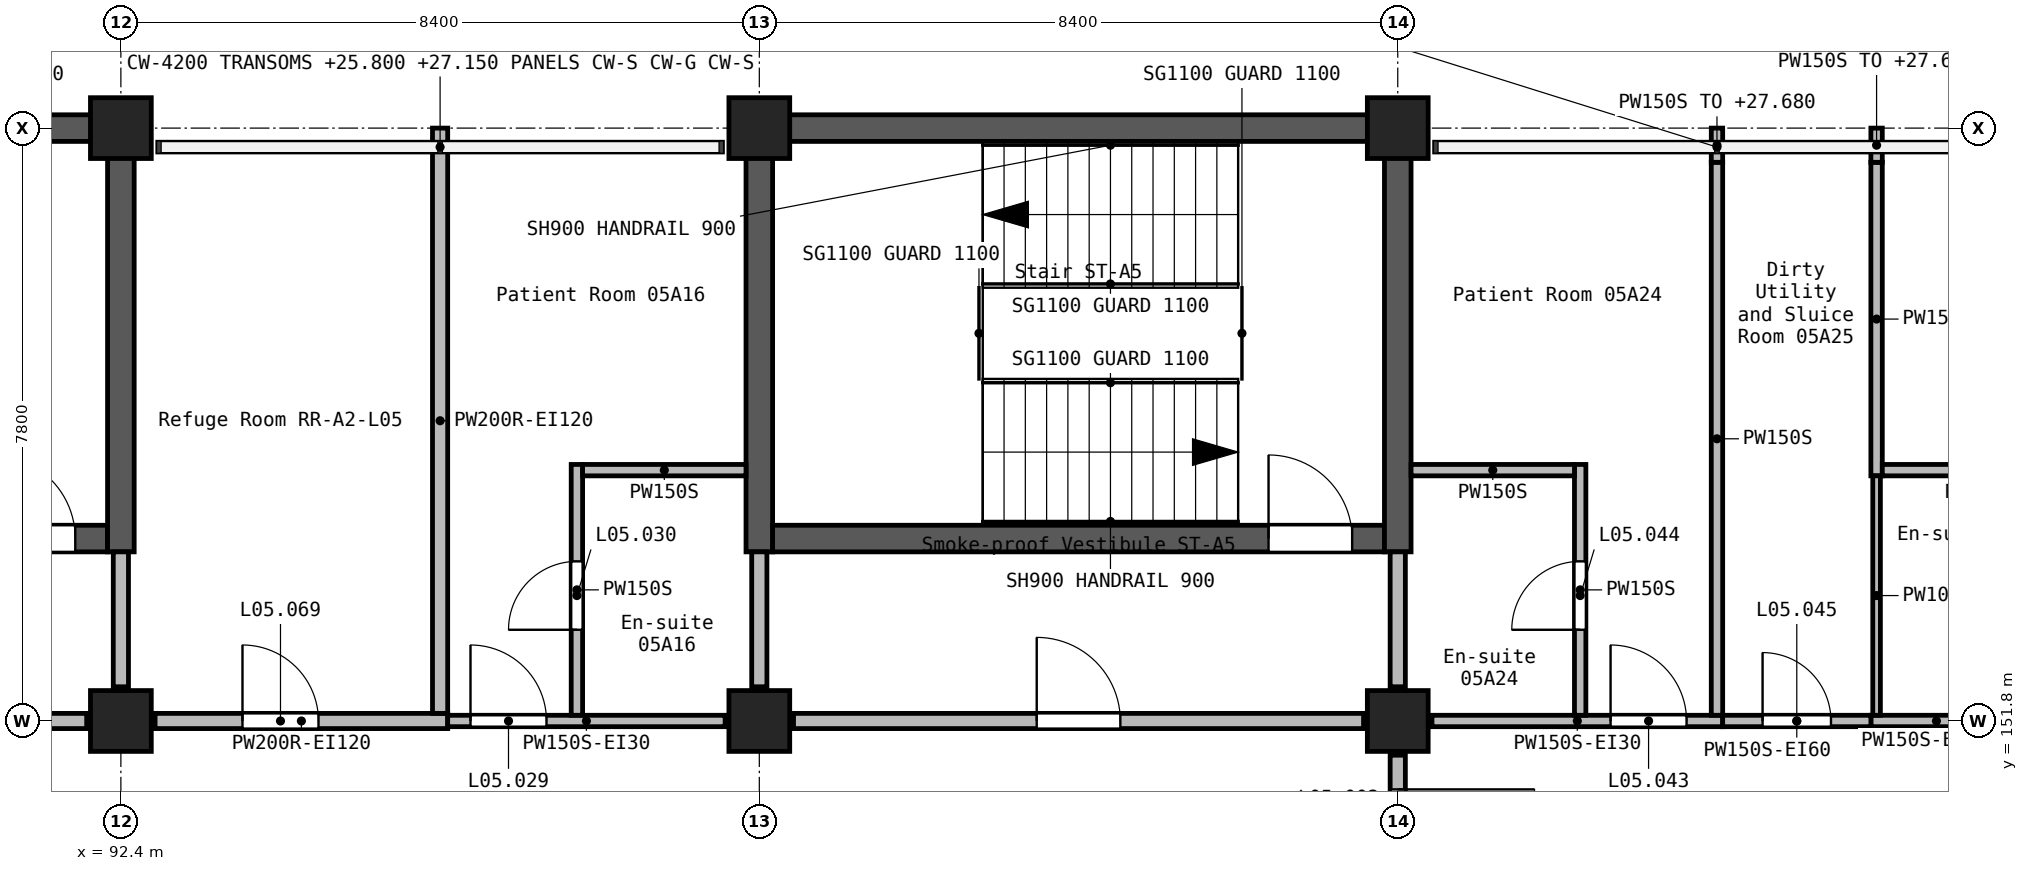
"""IFC4 building model, lengths in metres.
Left out: names, types, materials, properties, quantities, classifications, styles, units other than length and angle.
Written with IfcOpenShell. Run it as: python <this file> out.ifc"""

import sys

from ifc_helpers import new_model, si_unit, direction, frame, frame_2d, origin, origin_2d, place, context, subcontext, project, spatial, rectangle, extrude, element, fill, save


model = new_model("IFC4")
c1 = context("Model", 3, precision=1e-05, world=origin(), true_north=direction((0.0, 1.0)))
c2 = subcontext(c1, "Body", "Model", "MODEL_VIEW")
j1 = project(units=[si_unit("LENGTHUNIT", "METRE"), si_unit("PLANEANGLEUNIT", "RADIAN")], contexts=[c1])
p1 = place(None, origin())
s1 = spatial("IfcSite", under=j1, at=p1, CompositionType="ELEMENT")
p2 = place(p1, origin())
s2 = spatial("IfcBuilding", under=s1, at=p2, CompositionType="ELEMENT")
p3 = place(p2, frame((0.0, 0.0, 24.9)))
s3 = spatial("IfcBuildingStorey", under=s2, at=p3, CompositionType="ELEMENT", Elevation=24.9)
for number, where, z_axis, x_axis in (
    (1, (92.4, 151.8, 0.0), (0.0, 0.0, 1.0), (1.0, 0.0, 0.0)),
    (2, (92.4, 159.6, 0.0), (0.0, 0.0, 1.0), (1.0, 0.0, 0.0)),
    (3, (100.8, 151.8, 0.0), (0.0, 0.0, 1.0), (1.0, 0.0, 0.0)),
    (4, (100.8, 159.6, 0.0), (0.0, 0.0, 1.0), (1.0, 0.0, 0.0)),
    (5, (109.2, 151.8, 0.0), (0.0, 0.0, 1.0), (1.0, 0.0, 0.0)),
    (6, (109.2, 159.6, 0.0), (0.0, 0.0, 1.0), (1.0, 0.0, 0.0)),
):
    element("IfcColumn", number, at=place(p3, frame(where, z_axis=z_axis, x_axis=x_axis)), inside=s3, PredefinedType="COLUMN", context=c2, shape_type="SweptSolid", body=[
        extrude(rectangle(XDim=0.8, YDim=0.8, at=origin_2d()), origin(), (0.0, 0.0, 1.0), 3.9),
    ])
p4 = place(p3, frame((83.825, 159.6, 0.0), z_axis=(0.0, 0.0, 1.0), x_axis=(1.0, 0.0, 0.0)))
e7 = element("IfcWall", 7, at=p4, inside=s3, PredefinedType="SHEAR", context=c2, shape_type="SweptSolid", body=[
    extrude(rectangle(XDim=8.4, YDim=0.35, at=frame_2d((4.2, 0.0))), origin(), (0.0, 0.0, 1.0), 3.9),
])
p5 = place(p3, frame((84.175, 154.2, 0.0), z_axis=(0.0, 0.0, 1.0), x_axis=(1.0, 0.0, 0.0)))
e8 = element("IfcWall", 8, at=p5, inside=s3, PredefinedType="SHEAR", context=c2, shape_type="SweptSolid", body=[
    extrude(rectangle(XDim=8.05, YDim=0.35, at=frame_2d((4.025, 0.0))), origin(), (0.0, 0.0, 1.0), 3.9),
])
p6 = place(p5, frame((6.525, 0.0, 0.0)))
e9 = element("IfcOpeningElement", 9, at=p6, cuts=e8, PredefinedType="OPENING", context=c2, shape_type="SweptSolid", body=[
    extrude(rectangle(XDim=1.1, YDim=2.1, at=frame_2d((0.55, 1.05))), frame((0.0, 0.185, 0.0), z_axis=(0.0, -1.0, 0.0), x_axis=(1.0, 0.0, 0.0)), (0.0, 0.0, 1.0), 0.37),
])
p7 = place(p3, frame((92.4, 154.025, 0.0), z_axis=(0.0, 0.0, 1.0), x_axis=(0.0, 1.0, 0.0)))
e10 = element("IfcWall", 10, at=p7, inside=s3, PredefinedType="SHEAR", context=c2, shape_type="SweptSolid", body=[
    extrude(rectangle(XDim=5.75, YDim=0.35, at=frame_2d((2.875, 0.0))), origin(), (0.0, 0.0, 1.0), 3.9),
])
p8 = place(p3, frame((100.625, 159.6, 0.0), z_axis=(0.0, 0.0, 1.0), x_axis=(1.0, 0.0, 0.0)))
e11 = element("IfcWall", 11, at=p8, inside=s3, PredefinedType="SHEAR", context=c2, shape_type="SweptSolid", body=[
    extrude(rectangle(XDim=8.4, YDim=0.35, at=frame_2d((4.2, 0.0))), origin(), (0.0, 0.0, 1.0), 3.9),
])
p9 = place(p3, frame((100.8, 154.025, 0.0), z_axis=(0.0, 0.0, 1.0), x_axis=(0.0, 1.0, 0.0)))
e12 = element("IfcWall", 12, at=p9, inside=s3, PredefinedType="SHEAR", context=c2, shape_type="SweptSolid", body=[
    extrude(rectangle(XDim=5.4, YDim=0.35, at=frame_2d((2.7, 0.0))), origin(), (0.0, 0.0, 1.0), 3.9),
])
p10 = place(p3, frame((100.975, 154.2, 0.0), z_axis=(0.0, 0.0, 1.0), x_axis=(1.0, 0.0, 0.0)))
e13 = element("IfcWall", 13, at=p10, inside=s3, PredefinedType="SHEAR", context=c2, shape_type="SweptSolid", body=[
    extrude(rectangle(XDim=8.05, YDim=0.35, at=frame_2d((4.025, 0.0))), origin(), (0.0, 0.0, 1.0), 3.9),
])
p11 = place(p10, frame((6.525, 0.0, 0.0)))
e14 = element("IfcOpeningElement", 14, at=p11, cuts=e13, PredefinedType="OPENING", context=c2, shape_type="SweptSolid", body=[
    extrude(rectangle(XDim=1.1, YDim=2.1, at=frame_2d((0.55, 1.05))), frame((0.0, 0.185, 0.0), z_axis=(0.0, -1.0, 0.0), x_axis=(1.0, 0.0, 0.0)), (0.0, 0.0, 1.0), 0.37),
])
p12 = place(p3, frame((109.2, 154.025, 0.0), z_axis=(0.0, 0.0, 1.0), x_axis=(0.0, 1.0, 0.0)))
e15 = element("IfcWall", 15, at=p12, inside=s3, PredefinedType="SHEAR", context=c2, shape_type="SweptSolid", body=[
    extrude(rectangle(XDim=5.75, YDim=0.35, at=frame_2d((2.875, 0.0))), origin(), (0.0, 0.0, 1.0), 3.9),
])
p13 = place(p3, frame((109.2, 154.025, 0.0), z_axis=(0.0, 0.0, 1.0), x_axis=(0.0, -1.0, 0.0)))
e16 = element("IfcWall", 16, at=p13, inside=s3, PredefinedType="SOLIDWALL", context=c2, shape_type="SweptSolid", body=[
    extrude(rectangle(XDim=1.775, YDim=0.2, at=frame_2d((0.887, 0.0))), origin(), (0.0, 0.0, 1.0), 3.6),
])
p14 = place(p3, frame((109.2, 151.35, 0.0), z_axis=(0.0, 0.0, 1.0), x_axis=(0.0, -1.0, 0.0)))
e17 = element("IfcWall", 17, at=p14, inside=s3, PredefinedType="SOLIDWALL", context=c2, shape_type="SweptSolid", body=[
    extrude(rectangle(XDim=2.7, YDim=0.2, at=frame_2d((1.35, 0.0))), origin(), (0.0, 0.0, 1.0), 3.6),
])
p15 = place(p14, frame((0.45, 0.0, 0.0)))
e18 = element("IfcOpeningElement", 18, at=p15, cuts=e17, PredefinedType="OPENING", context=c2, shape_type="SweptSolid", body=[
    extrude(rectangle(XDim=1.8, YDim=2.1, at=frame_2d((0.9, 1.05))), frame((0.0, 0.11, 0.0), z_axis=(0.0, -1.0, 0.0), x_axis=(1.0, 0.0, 0.0)), (0.0, 0.0, 1.0), 0.22),
])
p16 = place(p3, frame((84.45, 151.8, 0.0), z_axis=(0.0, 0.0, 1.0), x_axis=(1.0, 0.0, 0.0)))
e19 = element("IfcWall", 19, at=p16, inside=s3, PredefinedType="SOLIDWALL", context=c2, shape_type="SweptSolid", body=[
    extrude(rectangle(XDim=7.5, YDim=0.2, at=frame_2d((3.75, 0.0))), origin(), (0.0, 0.0, 1.0), 3.6),
])
p17 = place(p16, frame((3.2, 0.0, 0.0)))
e20 = element("IfcOpeningElement", 20, at=p17, cuts=e19, PredefinedType="OPENING", context=c2, shape_type="SweptSolid", body=[
    extrude(rectangle(XDim=1.1, YDim=2.1, at=frame_2d((0.55, 1.05))), frame((0.0, 0.11, 0.0), z_axis=(0.0, -1.0, 0.0), x_axis=(1.0, 0.0, 0.0)), (0.0, 0.0, 1.0), 0.22),
])
p18 = place(p3, frame((92.85, 151.8, 0.0), z_axis=(0.0, 0.0, 1.0), x_axis=(1.0, 0.0, 0.0)))
e21 = element("IfcWall", 21, at=p18, inside=s3, PredefinedType="SOLIDWALL", context=c2, shape_type="SweptSolid", body=[
    extrude(rectangle(XDim=3.85, YDim=0.2, at=frame_2d((1.925, 0.0))), origin(), (0.0, 0.0, 1.0), 3.6),
])
p19 = place(p18, frame((1.15, 0.0, 0.0)))
e22 = element("IfcOpeningElement", 22, at=p19, cuts=e21, PredefinedType="OPENING", context=c2, shape_type="SweptSolid", body=[
    extrude(rectangle(XDim=1.0, YDim=2.1, at=frame_2d((0.5, 1.05))), frame((0.0, 0.11, 0.0), z_axis=(0.0, -1.0, 0.0), x_axis=(1.0, 0.0, 0.0)), (0.0, 0.0, 1.0), 0.22),
])
p20 = place(p3, frame((92.4, 152.25, 0.0), z_axis=(0.0, 0.0, 1.0), x_axis=(0.0, 1.0, 0.0)))
e23 = element("IfcWall", 23, at=p20, inside=s3, PredefinedType="SOLIDWALL", context=c2, shape_type="SweptSolid", body=[
    extrude(rectangle(XDim=1.775, YDim=0.2, at=frame_2d((0.887, 0.0))), origin(), (0.0, 0.0, 1.0), 3.6),
])
p21 = place(p3, frame((101.25, 151.8, 0.0), z_axis=(0.0, 0.0, 1.0), x_axis=(1.0, 0.0, 0.0)))
e24 = element("IfcWall", 24, at=p21, inside=s3, PredefinedType="SOLIDWALL", context=c2, shape_type="SweptSolid", body=[
    extrude(rectangle(XDim=7.5, YDim=0.2, at=frame_2d((3.75, 0.0))), origin(), (0.0, 0.0, 1.0), 3.6),
])
p22 = place(p21, frame((3.2, 0.0, 0.0)))
e25 = element("IfcOpeningElement", 25, at=p22, cuts=e24, PredefinedType="OPENING", context=c2, shape_type="SweptSolid", body=[
    extrude(rectangle(XDim=1.1, YDim=2.1, at=frame_2d((0.55, 1.05))), frame((0.0, 0.11, 0.0), z_axis=(0.0, -1.0, 0.0), x_axis=(1.0, 0.0, 0.0)), (0.0, 0.0, 1.0), 0.22),
])
p23 = place(p3, frame((96.6, 151.9, 0.0), z_axis=(0.0, 0.0, 1.0), x_axis=(0.0, 1.0, 0.0)))
e26 = element("IfcWall", 26, at=p23, inside=s3, PredefinedType="SOLIDWALL", context=c2, shape_type="SweptSolid", body=[
    extrude(rectangle(XDim=7.7, YDim=0.2, at=frame_2d((3.85, 0.0))), origin(), (0.0, 0.0, 1.0), 3.6),
])
p24 = place(p3, frame((100.8, 152.25, 0.0), z_axis=(0.0, 0.0, 1.0), x_axis=(0.0, 1.0, 0.0)))
e27 = element("IfcWall", 27, at=p24, inside=s3, PredefinedType="SOLIDWALL", context=c2, shape_type="SweptSolid", body=[
    extrude(rectangle(XDim=1.775, YDim=0.2, at=frame_2d((0.887, 0.0))), origin(), (0.0, 0.0, 1.0), 3.6),
])
p25 = place(p3, frame((117.15, 151.8, 0.0), z_axis=(0.0, 0.0, 1.0), x_axis=(-1.0, 0.0, 0.0)))
e28 = element("IfcWall", 28, at=p25, inside=s3, PredefinedType="PARTITIONING", context=c2, shape_type="SweptSolid", body=[
    extrude(rectangle(XDim=1.725, YDim=0.15, at=frame_2d((0.862, 0.0))), origin(), (0.0, 0.0, 1.0), 3.6),
])
p26 = place(p3, frame((96.7, 151.8, 0.0), z_axis=(0.0, 0.0, 1.0), x_axis=(1.0, 0.0, 0.0)))
e29 = element("IfcWall", 29, at=p26, inside=s3, PredefinedType="PARTITIONING", context=c2, shape_type="SweptSolid", body=[
    extrude(rectangle(XDim=3.65, YDim=0.15, at=frame_2d((1.825, 0.0))), origin(), (0.0, 0.0, 1.0), 3.6),
])
p27 = place(p26, frame((0.3, 0.0, 0.0)))
e30 = element("IfcOpeningElement", 30, at=p27, cuts=e29, PredefinedType="OPENING", context=c2, shape_type="SweptSolid", body=[
    extrude(rectangle(XDim=1.0, YDim=2.1, at=frame_2d((0.5, 1.05))), frame((0.0, 0.085, 0.0), z_axis=(0.0, -1.0, 0.0), x_axis=(1.0, 0.0, 0.0)), (0.0, 0.0, 1.0), 0.17),
])
p28 = place(p3, frame((109.65, 151.8, 0.0), z_axis=(0.0, 0.0, 1.0), x_axis=(1.0, 0.0, 0.0)))
e31 = element("IfcWall", 31, at=p28, inside=s3, PredefinedType="PARTITIONING", context=c2, shape_type="SweptSolid", body=[
    extrude(rectangle(XDim=3.825, YDim=0.15, at=frame_2d((1.913, 0.0))), origin(), (0.0, 0.0, 1.0), 3.6),
])
p29 = place(p28, frame((2.35, 0.0, 0.0)))
e32 = element("IfcOpeningElement", 32, at=p29, cuts=e31, PredefinedType="OPENING", context=c2, shape_type="SweptSolid", body=[
    extrude(rectangle(XDim=1.0, YDim=2.1, at=frame_2d((0.5, 1.05))), frame((0.0, 0.085, 0.0), z_axis=(0.0, -1.0, 0.0), x_axis=(1.0, 0.0, 0.0)), (0.0, 0.0, 1.0), 0.17),
])
p30 = place(p3, frame((113.475, 151.8, 0.0), z_axis=(0.0, 0.0, 1.0), x_axis=(1.0, 0.0, 0.0)))
e33 = element("IfcWall", 33, at=p30, inside=s3, PredefinedType="PARTITIONING", context=c2, shape_type="SweptSolid", body=[
    extrude(rectangle(XDim=1.95, YDim=0.15, at=frame_2d((0.975, 0.0))), origin(), (0.0, 0.0, 1.0), 3.6),
])
p31 = place(p30, frame((0.525, 0.0, 0.0)))
e34 = element("IfcOpeningElement", 34, at=p31, cuts=e33, PredefinedType="OPENING", context=c2, shape_type="SweptSolid", body=[
    extrude(rectangle(XDim=0.9, YDim=2.1, at=frame_2d((0.45, 1.05))), frame((0.0, 0.085, 0.0), z_axis=(0.0, -1.0, 0.0), x_axis=(1.0, 0.0, 0.0)), (0.0, 0.0, 1.0), 0.17),
])
p32 = place(p3, frame((113.4, 151.875, 0.0), z_axis=(0.0, 0.0, 1.0), x_axis=(0.0, 1.0, 0.0)))
e35 = element("IfcWall", 35, at=p32, inside=s3, PredefinedType="PARTITIONING", context=c2, shape_type="SweptSolid", body=[
    extrude(rectangle(XDim=7.275, YDim=0.15, at=frame_2d((3.637, 0.0))), origin(), (0.0, 0.0, 1.0), 3.6),
])
p33 = place(p3, frame((113.4, 159.15, 0.0), z_axis=(0.0, 0.0, 1.0), x_axis=(0.0, 1.0, 0.0)))
e36 = element("IfcWall", 36, at=p33, inside=s3, PredefinedType="PARTITIONING", context=c2, shape_type="SweptSolid", body=[
    extrude(rectangle(XDim=0.45, YDim=0.15, at=frame_2d((0.225, 0.0))), origin(), (0.0, 0.0, 1.0), 2.78),
])
p34 = place(p3, frame((115.5, 155.025, 0.0), z_axis=(0.0, 0.0, 1.0), x_axis=(0.0, 1.0, 0.0)))
e37 = element("IfcWall", 37, at=p34, inside=s3, PredefinedType="PARTITIONING", context=c2, shape_type="SweptSolid", body=[
    extrude(rectangle(XDim=4.125, YDim=0.15, at=frame_2d((2.062, 0.0))), origin(), (0.0, 0.0, 1.0), 3.6),
])
p35 = place(p3, frame((115.5, 159.15, 0.0), z_axis=(0.0, 0.0, 1.0), x_axis=(0.0, 1.0, 0.0)))
e38 = element("IfcWall", 38, at=p35, inside=s3, PredefinedType="PARTITIONING", context=c2, shape_type="SweptSolid", body=[
    extrude(rectangle(XDim=0.45, YDim=0.15, at=frame_2d((0.225, 0.0))), origin(), (0.0, 0.0, 1.0), 2.78),
])
p36 = place(p3, frame((98.4, 151.875, 0.0), z_axis=(0.0, 0.0, 1.0), x_axis=(0.0, 1.0, 0.0)))
e39 = element("IfcWall", 39, at=p36, inside=s3, PredefinedType="PARTITIONING", context=c2, shape_type="SweptSolid", body=[
    extrude(rectangle(XDim=3.3, YDim=0.15, at=frame_2d((1.65, 0.0))), origin(), (0.0, 0.0, 1.0), 3.6),
])
p37 = place(p36, frame((1.125, 0.0, 0.0)))
e40 = element("IfcOpeningElement", 40, at=p37, cuts=e39, PredefinedType="OPENING", context=c2, shape_type="SweptSolid", body=[
    extrude(rectangle(XDim=0.9, YDim=2.1, at=frame_2d((0.45, 1.05))), frame((0.0, 0.085, 0.0), z_axis=(0.0, -1.0, 0.0), x_axis=(1.0, 0.0, 0.0)), (0.0, 0.0, 1.0), 0.17),
])
p38 = place(p3, frame((111.6, 151.875, 0.0), z_axis=(0.0, 0.0, 1.0), x_axis=(0.0, 1.0, 0.0)))
e41 = element("IfcWall", 41, at=p38, inside=s3, PredefinedType="PARTITIONING", context=c2, shape_type="SweptSolid", body=[
    extrude(rectangle(XDim=3.3, YDim=0.15, at=frame_2d((1.65, 0.0))), origin(), (0.0, 0.0, 1.0), 3.6),
])
p39 = place(p38, frame((1.125, 0.0, 0.0)))
e42 = element("IfcOpeningElement", 42, at=p39, cuts=e41, PredefinedType="OPENING", context=c2, shape_type="SweptSolid", body=[
    extrude(rectangle(XDim=0.9, YDim=2.1, at=frame_2d((0.45, 1.05))), frame((0.0, 0.085, 0.0), z_axis=(0.0, -1.0, 0.0), x_axis=(1.0, 0.0, 0.0)), (0.0, 0.0, 1.0), 0.17),
])
p40 = place(p3, frame((115.575, 155.1, 0.0), z_axis=(0.0, 0.0, 1.0), x_axis=(1.0, 0.0, 0.0)))
e43 = element("IfcWall", 43, at=p40, inside=s3, PredefinedType="PARTITIONING", context=c2, shape_type="SweptSolid", body=[
    extrude(rectangle(XDim=2.55, YDim=0.15, at=frame_2d((1.275, 0.0))), origin(), (0.0, 0.0, 1.0), 3.6),
])
for number, where, z_axis, x_axis in (
    (44, (98.475, 155.1, 0.0), (0.0, 0.0, 1.0), (1.0, 0.0, 0.0)),
    (45, (109.375, 155.1, 0.0), (0.0, 0.0, 1.0), (1.0, 0.0, 0.0)),
):
    element("IfcWall", number, at=place(p3, frame(where, z_axis=z_axis, x_axis=x_axis)), inside=s3, PredefinedType="PARTITIONING", context=c2, shape_type="SweptSolid", body=[
        extrude(rectangle(XDim=2.15, YDim=0.15, at=frame_2d((1.075, 0.0))), origin(), (0.0, 0.0, 1.0), 3.6),
    ])
p41 = place(p3, frame((115.5, 151.875, 0.0), z_axis=(0.0, 0.0, 1.0), x_axis=(0.0, 1.0, 0.0)))
e46 = element("IfcWall", 46, at=p41, inside=s3, PredefinedType="PARTITIONING", context=c2, shape_type="SweptSolid", body=[
    extrude(rectangle(XDim=3.15, YDim=0.1, at=frame_2d((1.575, 0.0))), origin(), (0.0, 0.0, 1.0), 3.6),
])
p42 = place(p15, origin())
e47 = element("IfcDoor", 47, at=p42, inside=s3, OperationType="DOUBLE_DOOR_SINGLE_SWING", PredefinedType="DOOR", context=c2, shape_type="SweptSolid", body=[
    extrude(rectangle(XDim=1.8, YDim=2.1, at=frame_2d((0.9, 1.05))), frame((0.0, 0.025, 0.0), z_axis=(0.0, -1.0, 0.0), x_axis=(1.0, 0.0, 0.0)), (0.0, 0.0, 1.0), 0.05),
])
fill(e18, e47)
p43 = place(p27, origin())
e48 = element("IfcDoor", 48, at=p43, inside=s3, OperationType="SINGLE_SWING_LEFT", PredefinedType="DOOR", context=c2, shape_type="SweptSolid", body=[
    extrude(rectangle(XDim=1.0, YDim=2.1, at=frame_2d((0.5, 1.05))), frame((0.0, 0.025, 0.0), z_axis=(0.0, -1.0, 0.0), x_axis=(1.0, 0.0, 0.0)), (0.0, 0.0, 1.0), 0.05),
])
fill(e30, e48)
p44 = place(p37, frame((0.9, 0.0, 0.0), z_axis=(0.0, 0.0, 1.0), x_axis=(-1.0, 0.0, 0.0)))
e49 = element("IfcDoor", 49, at=p44, inside=s3, OperationType="SINGLE_SWING_RIGHT", PredefinedType="DOOR", context=c2, shape_type="SweptSolid", body=[
    extrude(rectangle(XDim=0.9, YDim=2.1, at=frame_2d((0.45, 1.05))), frame((0.0, 0.025, 0.0), z_axis=(0.0, -1.0, 0.0), x_axis=(1.0, 0.0, 0.0)), (0.0, 0.0, 1.0), 0.05),
])
fill(e40, e49)
p45 = place(p29, origin())
e50 = element("IfcDoor", 50, at=p45, inside=s3, OperationType="SINGLE_SWING_RIGHT", PredefinedType="DOOR", context=c2, shape_type="SweptSolid", body=[
    extrude(rectangle(XDim=1.0, YDim=2.1, at=frame_2d((0.5, 1.05))), frame((0.0, 0.025, 0.0), z_axis=(0.0, -1.0, 0.0), x_axis=(1.0, 0.0, 0.0)), (0.0, 0.0, 1.0), 0.05),
])
fill(e32, e50)
p46 = place(p39, origin())
e51 = element("IfcDoor", 51, at=p46, inside=s3, OperationType="SINGLE_SWING_LEFT", PredefinedType="DOOR", context=c2, shape_type="SweptSolid", body=[
    extrude(rectangle(XDim=0.9, YDim=2.1, at=frame_2d((0.45, 1.05))), frame((0.0, 0.025, 0.0), z_axis=(0.0, -1.0, 0.0), x_axis=(1.0, 0.0, 0.0)), (0.0, 0.0, 1.0), 0.05),
])
fill(e42, e51)
p47 = place(p31, origin())
e52 = element("IfcDoor", 52, at=p47, inside=s3, OperationType="SINGLE_SWING_RIGHT", PredefinedType="DOOR", context=c2, shape_type="SweptSolid", body=[
    extrude(rectangle(XDim=0.9, YDim=2.1, at=frame_2d((0.45, 1.05))), frame((0.0, 0.025, 0.0), z_axis=(0.0, -1.0, 0.0), x_axis=(1.0, 0.0, 0.0)), (0.0, 0.0, 1.0), 0.05),
])
fill(e34, e52)
p48 = place(p19, origin())
e53 = element("IfcDoor", 53, at=p48, inside=s3, OperationType="SINGLE_SWING_LEFT", PredefinedType="DOOR", context=c2, shape_type="SweptSolid", body=[
    extrude(rectangle(XDim=1.0, YDim=2.1, at=frame_2d((0.5, 1.05))), frame((0.0, 0.025, 0.0), z_axis=(0.0, -1.0, 0.0), x_axis=(1.0, 0.0, 0.0)), (0.0, 0.0, 1.0), 0.05),
])
fill(e22, e53)
p49 = place(p6, origin())
e54 = element("IfcDoor", 54, at=p49, inside=s3, OperationType="SINGLE_SWING_RIGHT", PredefinedType="DOOR", context=c2, shape_type="SweptSolid", body=[
    extrude(rectangle(XDim=1.1, YDim=2.1, at=frame_2d((0.55, 1.05))), frame((0.0, 0.025, 0.0), z_axis=(0.0, -1.0, 0.0), x_axis=(1.0, 0.0, 0.0)), (0.0, 0.0, 1.0), 0.05),
])
fill(e9, e54)
p50 = place(p11, origin())
e55 = element("IfcDoor", 55, at=p50, inside=s3, OperationType="SINGLE_SWING_RIGHT", PredefinedType="DOOR", context=c2, shape_type="SweptSolid", body=[
    extrude(rectangle(XDim=1.1, YDim=2.1, at=frame_2d((0.55, 1.05))), frame((0.0, 0.025, 0.0), z_axis=(0.0, -1.0, 0.0), x_axis=(1.0, 0.0, 0.0)), (0.0, 0.0, 1.0), 0.05),
])
fill(e14, e55)
p51 = place(p22, origin())
e56 = element("IfcDoor", 56, at=p51, inside=s3, OperationType="SINGLE_SWING_RIGHT", PredefinedType="DOOR", context=c2, shape_type="SweptSolid", body=[
    extrude(rectangle(XDim=1.1, YDim=2.1, at=frame_2d((0.55, 1.05))), frame((0.0, 0.025, 0.0), z_axis=(0.0, -1.0, 0.0), x_axis=(1.0, 0.0, 0.0)), (0.0, 0.0, 1.0), 0.05),
])
fill(e25, e56)
save(model, sys.argv[1])
